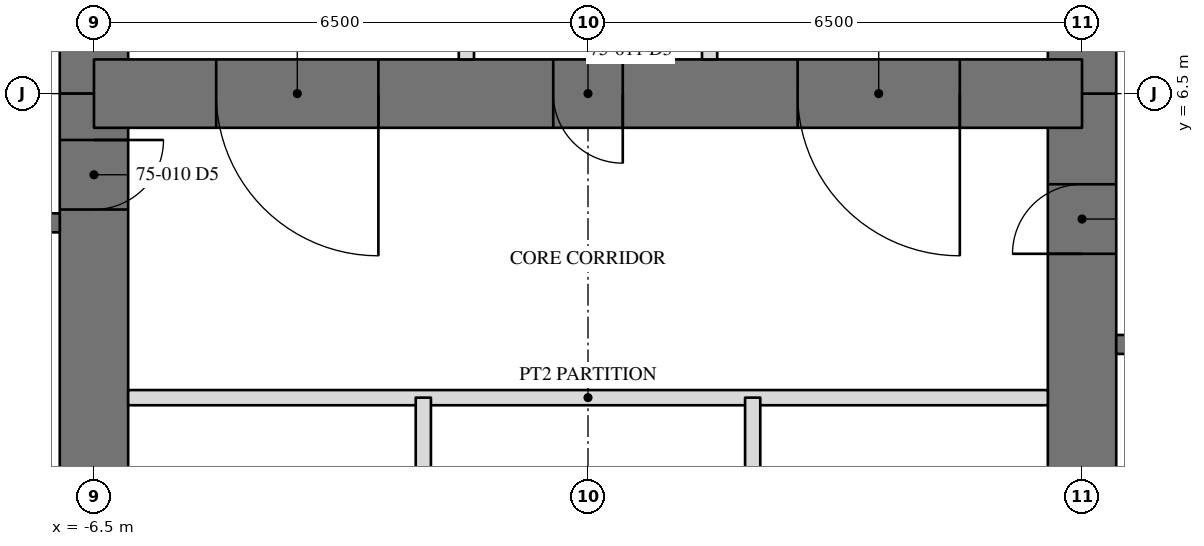
"""IFC4 building model, lengths in metres.
Left out: names, types, materials, properties, quantities, classifications, styles, units other than length and angle.
Written with IfcOpenShell. Run it as: python <this file> out.ifc"""

import sys

from ifc_helpers import new_model, si_unit, direction, frame, frame_2d, origin, place, context, subcontext, project, spatial, rectangle, extrude, element, fill, save


model = new_model("IFC4")
c1 = context("Model", 3, precision=1e-05, world=origin(), true_north=direction((0.0, 1.0)))
c2 = subcontext(c1, "Body", "Model", "MODEL_VIEW")
j1 = project(units=[si_unit("LENGTHUNIT", "METRE"), si_unit("PLANEANGLEUNIT", "RADIAN")], contexts=[c1])
p1 = place(None, origin())
s1 = spatial("IfcSite", under=j1, at=p1, CompositionType="ELEMENT")
p2 = place(p1, origin())
s2 = spatial("IfcBuilding", under=s1, at=p2, CompositionType="ELEMENT")
p3 = place(p2, frame((0.0, 0.0, 304.2)))
s3 = spatial("IfcBuildingStorey", under=s2, at=p3, CompositionType="ELEMENT", Elevation=304.2)
p4 = place(p3, frame((6.5, -6.5, 0.0), z_axis=(0.0, 0.0, 1.0), x_axis=(0.0, 1.0, 0.0)))
e1 = element("IfcWall", 1, at=p4, inside=s3, PredefinedType="SHEAR", context=c2, shape_type="SweptSolid", body=[
    extrude(rectangle(XDim=13.0, YDim=0.9, at=frame_2d((6.5, 0.0))), origin(), (0.0, 0.0, 1.0), 6.0),
])
p5 = place(p4, frame((10.893, 0.0, 0.0)))
e2 = element("IfcOpeningElement", 2, at=p5, cuts=e1, PredefinedType="OPENING", context=c2, shape_type="SweptSolid", body=[
    extrude(rectangle(XDim=0.915, YDim=2.134, at=frame_2d((0.458, 1.067))), frame((0.0, 0.46, 0.0), z_axis=(0.0, -1.0, 0.0), x_axis=(1.0, 0.0, 0.0)), (0.0, 0.0, 1.0), 0.92),
])
p6 = place(p4, frame((0.61, 0.0, 0.0)))
e3 = element("IfcOpeningElement", 3, at=p6, cuts=e1, PredefinedType="OPENING", context=c2, shape_type="SweptSolid", body=[
    extrude(rectangle(XDim=0.915, YDim=2.134, at=frame_2d((0.458, 1.067))), frame((0.0, 0.46, 0.0), z_axis=(0.0, -1.0, 0.0), x_axis=(1.0, 0.0, 0.0)), (0.0, 0.0, 1.0), 0.92),
])
for number, where, z_axis, x_axis in (
    (4, (6.5, 6.5, 0.0), (0.0, 0.0, 1.0), (0.0, 1.0, 0.0)),
    (5, (-6.5, 11.0, 0.0), (0.0, 0.0, 1.0), (0.0, -1.0, 0.0)),
):
    element("IfcWall", number, at=place(p3, frame(where, z_axis=z_axis, x_axis=x_axis)), inside=s3, PredefinedType="SHEAR", context=c2, shape_type="SweptSolid", body=[
        extrude(rectangle(XDim=4.5, YDim=0.9, at=frame_2d((2.25, 0.0))), origin(), (0.0, 0.0, 1.0), 6.0),
    ])
p7 = place(p3, frame((-6.5, 6.5, 0.0), z_axis=(0.0, 0.0, 1.0), x_axis=(0.0, -1.0, 0.0)))
e6 = element("IfcWall", 6, at=p7, inside=s3, PredefinedType="SHEAR", context=c2, shape_type="SweptSolid", body=[
    extrude(rectangle(XDim=13.0, YDim=0.9, at=frame_2d((6.5, 0.0))), origin(), (0.0, 0.0, 1.0), 6.0),
])
p8 = place(p7, frame((10.893, 0.0, 0.0)))
e7 = element("IfcOpeningElement", 7, at=p8, cuts=e6, PredefinedType="OPENING", context=c2, shape_type="SweptSolid", body=[
    extrude(rectangle(XDim=0.915, YDim=2.134, at=frame_2d((0.458, 1.067))), frame((0.0, 0.46, 0.0), z_axis=(0.0, -1.0, 0.0), x_axis=(1.0, 0.0, 0.0)), (0.0, 0.0, 1.0), 0.92),
])
p9 = place(p7, frame((0.61, 0.0, 0.0)))
e8 = element("IfcOpeningElement", 8, at=p9, cuts=e6, PredefinedType="OPENING", context=c2, shape_type="SweptSolid", body=[
    extrude(rectangle(XDim=0.915, YDim=2.134, at=frame_2d((0.458, 1.067))), frame((0.0, 0.46, 0.0), z_axis=(0.0, -1.0, 0.0), x_axis=(1.0, 0.0, 0.0)), (0.0, 0.0, 1.0), 0.92),
])
p10 = place(p3, frame((6.5, 6.5, 0.0), z_axis=(0.0, 0.0, 1.0), x_axis=(-1.0, 0.0, 0.0)))
e9 = element("IfcWall", 9, at=p10, inside=s3, PredefinedType="SHEAR", context=c2, shape_type="SweptSolid", body=[
    extrude(rectangle(XDim=13.0, YDim=0.9, at=frame_2d((6.5, 0.0))), origin(), (0.0, 0.0, 1.0), 6.0),
])
p11 = place(p10, frame((6.042, 0.0, 0.0)))
e10 = element("IfcOpeningElement", 10, at=p11, cuts=e9, PredefinedType="OPENING", context=c2, shape_type="SweptSolid", body=[
    extrude(rectangle(XDim=0.915, YDim=2.134, at=frame_2d((0.458, 1.067))), frame((0.0, 0.46, 0.0), z_axis=(0.0, -1.0, 0.0), x_axis=(1.0, 0.0, 0.0)), (0.0, 0.0, 1.0), 0.92),
])
p12 = place(p10, frame((9.258, 0.0, 0.0)))
e11 = element("IfcOpeningElement", 11, at=p12, cuts=e9, PredefinedType="OPENING", context=c2, shape_type="SweptSolid", body=[
    extrude(rectangle(XDim=2.134, YDim=2.438, at=frame_2d((1.067, 1.219))), frame((0.0, 0.46, 0.0), z_axis=(0.0, -1.0, 0.0), x_axis=(1.0, 0.0, 0.0)), (0.0, 0.0, 1.0), 0.92),
])
p13 = place(p10, frame((1.608, 0.0, 0.0)))
e12 = element("IfcOpeningElement", 12, at=p13, cuts=e9, PredefinedType="OPENING", context=c2, shape_type="SweptSolid", body=[
    extrude(rectangle(XDim=2.134, YDim=2.438, at=frame_2d((1.067, 1.219))), frame((0.0, 0.46, 0.0), z_axis=(0.0, -1.0, 0.0), x_axis=(1.0, 0.0, 0.0)), (0.0, 0.0, 1.0), 0.92),
])
p14 = place(p3, frame((-6.95, 4.8, 0.0), z_axis=(0.0, 0.0, 1.0), x_axis=(-1.0, 0.0, 0.0)))
e13 = element("IfcWall", 13, at=p14, inside=s3, PredefinedType="SOLIDWALL", context=c2, shape_type="SweptSolid", body=[
    extrude(rectangle(XDim=3.75, YDim=0.25, at=frame_2d((1.875, 0.0))), origin(), (0.0, 0.0, 1.0), 5.81),
])
p15 = place(p3, frame((6.95, 3.2, 0.0), z_axis=(0.0, 0.0, 1.0), x_axis=(1.0, 0.0, 0.0)))
e14 = element("IfcWall", 14, at=p15, inside=s3, PredefinedType="SOLIDWALL", context=c2, shape_type="SweptSolid", body=[
    extrude(rectangle(XDim=3.75, YDim=0.25, at=frame_2d((1.875, 0.0))), origin(), (0.0, 0.0, 1.0), 5.81),
])
p16 = place(p15, frame((1.342, 0.0, 0.0)))
e15 = element("IfcOpeningElement", 15, at=p16, cuts=e14, PredefinedType="OPENING", context=c2, shape_type="SweptSolid", body=[
    extrude(rectangle(XDim=1.067, YDim=2.134, at=frame_2d((0.533, 1.067))), frame((0.0, 0.135, 0.0), z_axis=(0.0, -1.0, 0.0), x_axis=(1.0, 0.0, 0.0)), (0.0, 0.0, 1.0), 0.27),
])
p17 = place(p3, frame((-6.05, 2.5, 0.0), z_axis=(0.0, 0.0, 1.0), x_axis=(1.0, 0.0, 0.0)))
e16 = element("IfcWall", 16, at=p17, inside=s3, PredefinedType="PARTITIONING", context=c2, shape_type="SweptSolid", body=[
    extrude(rectangle(XDim=12.1, YDim=0.2, at=frame_2d((6.05, 0.0))), origin(), (0.0, 0.0, 1.0), 5.81),
])
for number, where, z_axis, x_axis in (
    (17, (-2.167, -2.5, 0.0), (0.0, 0.0, 1.0), (0.0, 1.0, 0.0)),
    (18, (2.167, -2.5, 0.0), (0.0, 0.0, 1.0), (0.0, 1.0, 0.0)),
):
    element("IfcWall", number, at=place(p3, frame(where, z_axis=z_axis, x_axis=x_axis)), inside=s3, PredefinedType="PARTITIONING", context=c2, shape_type="SweptSolid", body=[
        extrude(rectangle(XDim=5.0, YDim=0.2, at=frame_2d((2.5, 0.0))), origin(), (0.0, 0.0, 1.0), 5.81),
    ])
for number, where, z_axis, x_axis in (
    (19, (-1.6, 6.95, 0.0), (0.0, 0.0, 1.0), (0.0, 1.0, 0.0)),
    (20, (1.6, 6.95, 0.0), (0.0, 0.0, 1.0), (0.0, 1.0, 0.0)),
):
    element("IfcWall", number, at=place(p3, frame(where, z_axis=z_axis, x_axis=x_axis)), inside=s3, PredefinedType="PARTITIONING", context=c2, shape_type="SweptSolid", body=[
        extrude(rectangle(XDim=3.75, YDim=0.2, at=frame_2d((1.875, 0.0))), origin(), (0.0, 0.0, 1.0), 5.81),
    ])
p18 = place(p5, origin())
e21 = element("IfcDoor", 21, at=p18, inside=s3, OperationType="SINGLE_SWING_RIGHT", PredefinedType="DOOR", context=c2, shape_type="SweptSolid", body=[
    extrude(rectangle(XDim=0.915, YDim=2.134, at=frame_2d((0.458, 1.067))), frame((0.0, -0.375, 0.0), z_axis=(0.0, -1.0, 0.0), x_axis=(1.0, 0.0, 0.0)), (0.0, 0.0, 1.0), 0.05),
])
fill(e2, e21)
p19 = place(p9, origin())
e22 = element("IfcDoor", 22, at=p19, inside=s3, OperationType="SINGLE_SWING_RIGHT", PredefinedType="DOOR", context=c2, shape_type="SweptSolid", body=[
    extrude(rectangle(XDim=0.915, YDim=2.134, at=frame_2d((0.458, 1.067))), frame((0.0, -0.375, 0.0), z_axis=(0.0, -1.0, 0.0), x_axis=(1.0, 0.0, 0.0)), (0.0, 0.0, 1.0), 0.05),
])
fill(e8, e22)
p20 = place(p11, origin())
e23 = element("IfcDoor", 23, at=p20, inside=s3, OperationType="SINGLE_SWING_RIGHT", PredefinedType="DOOR", context=c2, shape_type="SweptSolid", body=[
    extrude(rectangle(XDim=0.915, YDim=2.134, at=frame_2d((0.458, 1.067))), frame((0.0, -0.375, 0.0), z_axis=(0.0, -1.0, 0.0), x_axis=(1.0, 0.0, 0.0)), (0.0, 0.0, 1.0), 0.05),
])
fill(e10, e23)
p21 = place(p12, origin())
e24 = element("IfcDoor", 24, at=p21, inside=s3, OperationType="DOUBLE_DOOR_SINGLE_SWING", PredefinedType="DOOR", context=c2, shape_type="SweptSolid", body=[
    extrude(rectangle(XDim=2.134, YDim=2.438, at=frame_2d((1.067, 1.219))), frame((0.0, -0.375, 0.0), z_axis=(0.0, -1.0, 0.0), x_axis=(1.0, 0.0, 0.0)), (0.0, 0.0, 1.0), 0.05),
])
fill(e11, e24)
p22 = place(p13, origin())
e25 = element("IfcDoor", 25, at=p22, inside=s3, OperationType="DOUBLE_DOOR_SINGLE_SWING", PredefinedType="DOOR", context=c2, shape_type="SweptSolid", body=[
    extrude(rectangle(XDim=2.134, YDim=2.438, at=frame_2d((1.067, 1.219))), frame((0.0, -0.375, 0.0), z_axis=(0.0, -1.0, 0.0), x_axis=(1.0, 0.0, 0.0)), (0.0, 0.0, 1.0), 0.05),
])
fill(e12, e25)
save(model, sys.argv[1])
